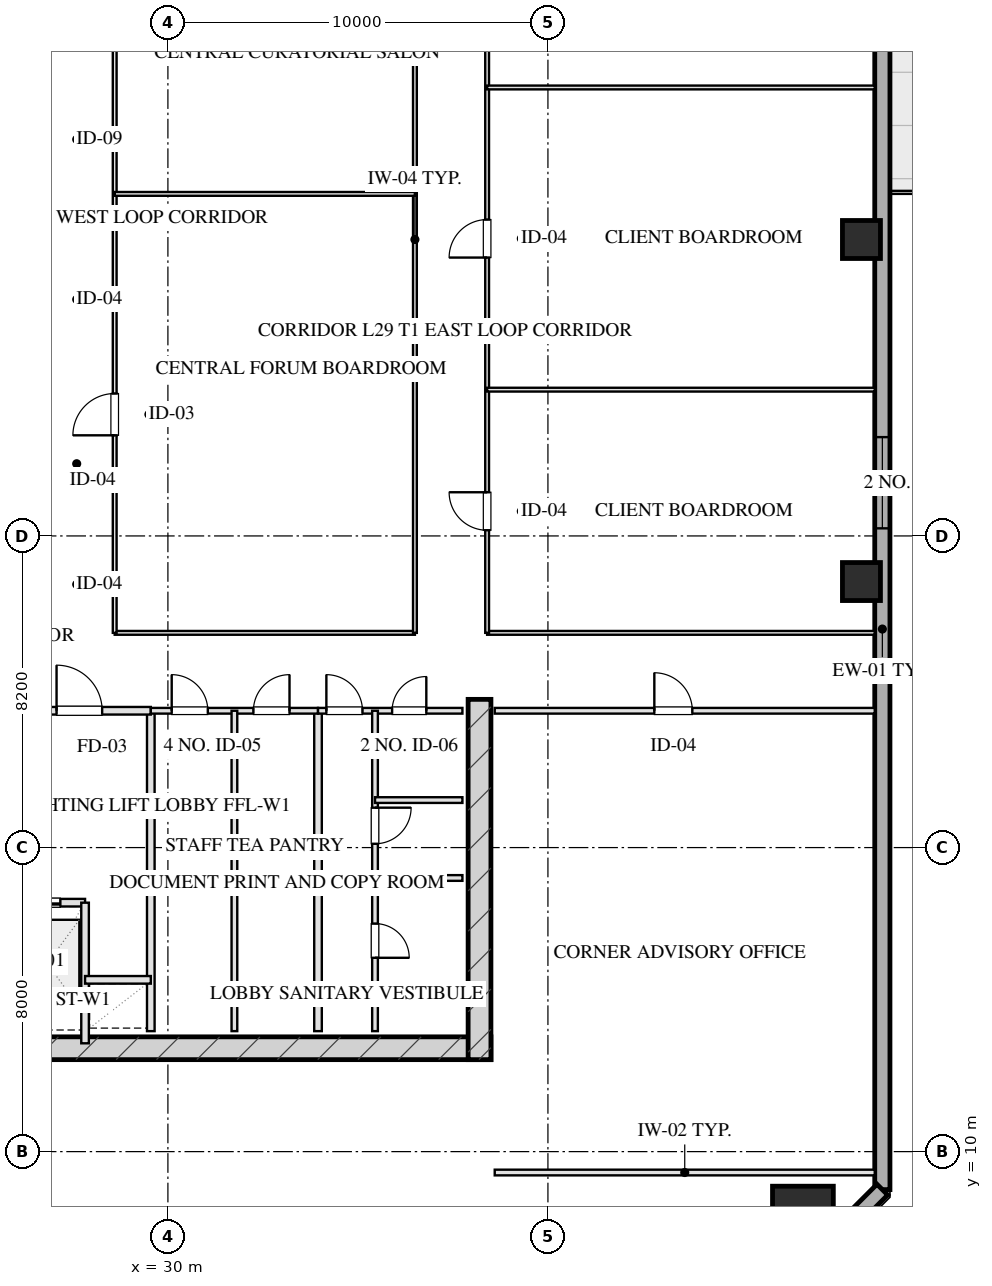
"""IFC4 building model, lengths in metres.
Left out: names, types, materials, properties, quantities, classifications, styles, units other than length and angle.
Written with IfcOpenShell. Run it as: python <this file> out.ifc"""

import sys

from ifc_helpers import new_model, si_unit, direction, frame, frame_2d, origin, origin_2d, place, context, subcontext, project, spatial, rectangle, hollow_rectangle, extrude, element, fill, save


model = new_model("IFC4")
c1 = context("Model", 3, precision=1e-05, world=origin(), true_north=direction((0.0, 1.0)))
c2 = subcontext(c1, "Body", "Model", "MODEL_VIEW")
j1 = project(units=[si_unit("LENGTHUNIT", "METRE"), si_unit("PLANEANGLEUNIT", "RADIAN")], contexts=[c1])
p1 = place(None, origin())
s1 = spatial("IfcSite", under=j1, at=p1, CompositionType="ELEMENT")
p2 = place(p1, origin())
s2 = spatial("IfcBuilding", under=s1, at=p2, CompositionType="ELEMENT")
p3 = place(p2, frame((0.0, 0.0, 113.85)))
s3 = spatial("IfcBuildingStorey", under=s2, at=p3, CompositionType="ELEMENT", Elevation=113.85)
p4 = place(p3, frame((21.5, 12.72, 0.0), z_axis=(0.0, 0.0, 1.0), x_axis=(1.0, 0.0, 0.0)))
e1 = element("IfcWall", 1, at=p4, inside=s3, PredefinedType="SHEAR", context=c2, shape_type="SweptSolid", body=[
    extrude(rectangle(XDim=17.0, YDim=0.6, at=frame_2d((8.5, 0.0))), origin(), (0.0, 0.0, 1.0), 3.45),
])
p5 = place(p3, frame((38.2, 21.9, 0.0), z_axis=(0.0, 0.0, 1.0), x_axis=(0.0, -1.0, 0.0)))
e2 = element("IfcWall", 2, at=p5, inside=s3, PredefinedType="SHEAR", context=c2, shape_type="SweptSolid", body=[
    extrude(rectangle(XDim=9.48, YDim=0.6, at=frame_2d((4.74, 0.0))), origin(), (0.0, 0.0, 1.0), 3.45),
])
p6 = place(p3, frame((46.71, 8.29, 0.0), z_axis=(0.0, 0.0, 1.0), x_axis=(1.0, 0.0, 0.0)))
e3 = element("IfcColumn", 3, at=p6, inside=s3, PredefinedType="COLUMN", context=c2, shape_type="SweptSolid", body=[
    extrude(hollow_rectangle(XDim=1.6, YDim=1.6, WallThickness=0.055, at=origin_2d()), origin(), (0.0, 0.0, 1.0), 3.451),
])
for number, where, z_axis, x_axis in (
    (4, (48.25, 25.0, 0.0), (0.0, 0.0, 1.0), (1.0, 0.0, 0.0)),
    (5, (48.25, 34.0, 0.0), (0.0, 0.0, 1.0), (1.0, 0.0, 0.0)),
):
    element("IfcColumn", number, at=place(p3, frame(where, z_axis=z_axis, x_axis=x_axis)), inside=s3, PredefinedType="COLUMN", context=c2, shape_type="SweptSolid", body=[
        extrude(hollow_rectangle(XDim=1.0, YDim=1.0, WallThickness=0.036, at=origin_2d()), origin(), (0.0, 0.0, 1.0), 3.451),
    ])
p7 = place(p3, frame((48.8, 59.0, 0.0), z_axis=(0.0, 0.0, 1.0), x_axis=(0.0, -1.0, 0.0)))
e6 = element("IfcWall", 6, at=p7, inside=s3, PredefinedType="SOLIDWALL", context=c2, shape_type="SweptSolid", body=[
    extrude(rectangle(XDim=50.0, YDim=0.4, at=frame_2d((25.0, 0.0))), origin(), (0.0, 0.0, 1.0), 2.61),
])
p8 = place(p7, frame((30.2, 0.0, 0.75)))
e7 = element("IfcOpeningElement", 7, at=p8, cuts=e6, PredefinedType="OPENING", context=c2, shape_type="SweptSolid", body=[
    extrude(rectangle(XDim=2.4, YDim=1.46, at=frame_2d((1.2, 0.73))), frame((0.0, 0.21, 0.0), z_axis=(0.0, -1.0, 0.0), x_axis=(1.0, 0.0, 0.0)), (0.0, 0.0, 1.0), 0.42),
])
p9 = place(p7, frame((18.65, 0.0, 0.0)))
e8 = element("IfcOpeningElement", 8, at=p9, cuts=e6, PredefinedType="OPENING", context=c2, shape_type="SweptSolid", body=[
    extrude(rectangle(XDim=1.1, YDim=2.15, at=frame_2d((0.55, 1.075))), frame((0.0, 0.21, 0.0), z_axis=(0.0, -1.0, 0.0), x_axis=(1.0, 0.0, 0.0)), (0.0, 0.0, 1.0), 0.42),
])
p10 = place(p3, frame((48.8, 9.0, 0.0), z_axis=(0.0, 0.0, 1.0), x_axis=(-0.707106781187, -0.707106781187, 0.0)))
e9 = element("IfcWall", 9, at=p10, inside=s3, PredefinedType="SOLIDWALL", context=c2, shape_type="SweptSolid", body=[
    extrude(rectangle(XDim=3.96, YDim=0.4, at=frame_2d((1.98, 0.0))), origin(), (0.0, 0.0, 1.0), 2.61),
])
p11 = place(p3, frame((29.55, 21.6, 0.0), z_axis=(0.0, 0.0, 1.0), x_axis=(0.0, -1.0, 0.0)))
e10 = element("IfcWall", 10, at=p11, inside=s3, PredefinedType="PARTITIONING", context=c2, shape_type="SweptSolid", body=[
    extrude(rectangle(XDim=8.43, YDim=0.2, at=frame_2d((4.215, 0.0))), origin(), (0.0, 0.0, 1.0), 3.175),
])
p12 = place(p3, frame((25.72, 21.6, 0.0), z_axis=(0.0, 0.0, 1.0), x_axis=(1.0, 0.0, 0.0)))
e11 = element("IfcWall", 11, at=p12, inside=s3, PredefinedType="PARTITIONING", context=c2, shape_type="SweptSolid", body=[
    extrude(rectangle(XDim=3.83, YDim=0.2, at=frame_2d((1.915, 0.0))), origin(), (0.0, 0.0, 1.0), 3.175),
])
p13 = place(p12, frame((1.35, 0.0, 0.0)))
e12 = element("IfcOpeningElement", 12, at=p13, cuts=e11, PredefinedType="OPENING", context=c2, shape_type="SweptSolid", body=[
    extrude(rectangle(XDim=1.2, YDim=2.05, at=frame_2d((0.6, 1.025))), frame((0.0, 0.11, 0.0), z_axis=(0.0, -1.0, 0.0), x_axis=(1.0, 0.0, 0.0)), (0.0, 0.0, 1.0), 0.22),
])
p14 = place(p3, frame((25.72, 16.55, 0.0), z_axis=(0.0, 0.0, 1.0), x_axis=(1.0, 0.0, 0.0)))
e13 = element("IfcWall", 13, at=p14, inside=s3, PredefinedType="PARTITIONING", context=c2, shape_type="SweptSolid", body=[
    extrude(rectangle(XDim=2.1, YDim=0.2, at=frame_2d((1.05, 0.0))), origin(), (0.0, 0.0, 1.0), 3.175),
])
p15 = place(p14, frame((0.35, 0.0, 0.0)))
e14 = element("IfcOpeningElement", 14, at=p15, cuts=e13, PredefinedType="OPENING", context=c2, shape_type="SweptSolid", body=[
    extrude(rectangle(XDim=1.1, YDim=2.05, at=frame_2d((0.55, 1.025))), frame((0.0, 0.11, 0.0), z_axis=(0.0, -1.0, 0.0), x_axis=(1.0, 0.0, 0.0)), (0.0, 0.0, 1.0), 0.22),
])
p16 = place(p3, frame((27.82, 16.55, 0.0), z_axis=(0.0, 0.0, 1.0), x_axis=(0.0, -1.0, 0.0)))
e15 = element("IfcWall", 15, at=p16, inside=s3, PredefinedType="PARTITIONING", context=c2, shape_type="SweptSolid", body=[
    extrude(rectangle(XDim=3.7, YDim=0.2, at=frame_2d((1.85, 0.0))), origin(), (0.0, 0.0, 1.0), 3.175),
])
p17 = place(p3, frame((27.82, 14.52, 0.0), z_axis=(0.0, 0.0, 1.0), x_axis=(1.0, 0.0, 0.0)))
e16 = element("IfcWall", 16, at=p17, inside=s3, PredefinedType="PARTITIONING", context=c2, shape_type="SweptSolid", body=[
    extrude(rectangle(XDim=1.73, YDim=0.2, at=frame_2d((0.865, 0.0))), origin(), (0.0, 0.0, 1.0), 3.175),
])
p18 = place(p3, frame((33.95, 21.6, 0.0), z_axis=(0.0, 0.0, 1.0), x_axis=(0.0, -1.0, 0.0)))
e17 = element("IfcWall", 17, at=p18, inside=s3, PredefinedType="PARTITIONING", context=c2, shape_type="SweptSolid", body=[
    extrude(rectangle(XDim=8.43, YDim=0.2, at=frame_2d((4.215, 0.0))), origin(), (0.0, 0.0, 1.0), 3.175),
])
p19 = place(p3, frame((29.55, 21.6, 0.0), z_axis=(0.0, 0.0, 1.0), x_axis=(1.0, 0.0, 0.0)))
e18 = element("IfcWall", 18, at=p19, inside=s3, PredefinedType="PARTITIONING", context=c2, shape_type="SweptSolid", body=[
    extrude(rectangle(XDim=4.4, YDim=0.15, at=frame_2d((2.2, 0.0))), origin(), (0.0, 0.0, 1.0), 3.175),
])
p20 = place(p19, frame((0.55, 0.0, 0.0)))
e19 = element("IfcOpeningElement", 19, at=p20, cuts=e18, PredefinedType="OPENING", context=c2, shape_type="SweptSolid", body=[
    extrude(rectangle(XDim=0.95, YDim=2.05, at=frame_2d((0.475, 1.025))), frame((0.0, 0.085, 0.0), z_axis=(0.0, -1.0, 0.0), x_axis=(1.0, 0.0, 0.0)), (0.0, 0.0, 1.0), 0.17),
])
p21 = place(p19, frame((2.7, 0.0, 0.0)))
e20 = element("IfcOpeningElement", 20, at=p21, cuts=e18, PredefinedType="OPENING", context=c2, shape_type="SweptSolid", body=[
    extrude(rectangle(XDim=0.95, YDim=2.05, at=frame_2d((0.475, 1.025))), frame((0.0, 0.085, 0.0), z_axis=(0.0, -1.0, 0.0), x_axis=(1.0, 0.0, 0.0)), (0.0, 0.0, 1.0), 0.17),
])
p22 = place(p3, frame((31.75, 21.6, 0.0), z_axis=(0.0, 0.0, 1.0), x_axis=(0.0, -1.0, 0.0)))
e21 = element("IfcWall", 21, at=p22, inside=s3, PredefinedType="PARTITIONING", context=c2, shape_type="SweptSolid", body=[
    extrude(rectangle(XDim=8.43, YDim=0.15, at=frame_2d((4.215, 0.0))), origin(), (0.0, 0.0, 1.0), 3.175),
])
p23 = place(p3, frame((33.95, 21.6, 0.0), z_axis=(0.0, 0.0, 1.0), x_axis=(1.0, 0.0, 0.0)))
e22 = element("IfcWall", 22, at=p23, inside=s3, PredefinedType="PARTITIONING", context=c2, shape_type="SweptSolid", body=[
    extrude(rectangle(XDim=3.8, YDim=0.15, at=frame_2d((1.9, 0.0))), origin(), (0.0, 0.0, 1.0), 3.175),
])
p24 = place(p23, frame((0.22, 0.0, 0.0)))
e23 = element("IfcOpeningElement", 23, at=p24, cuts=e22, PredefinedType="OPENING", context=c2, shape_type="SweptSolid", body=[
    extrude(rectangle(XDim=0.95, YDim=2.05, at=frame_2d((0.475, 1.025))), frame((0.0, 0.085, 0.0), z_axis=(0.0, -1.0, 0.0), x_axis=(1.0, 0.0, 0.0)), (0.0, 0.0, 1.0), 0.17),
])
p25 = place(p23, frame((1.95, 0.0, 0.0)))
e24 = element("IfcOpeningElement", 24, at=p25, cuts=e22, PredefinedType="OPENING", context=c2, shape_type="SweptSolid", body=[
    extrude(rectangle(XDim=0.9, YDim=2.05, at=frame_2d((0.45, 1.025))), frame((0.0, 0.085, 0.0), z_axis=(0.0, -1.0, 0.0), x_axis=(1.0, 0.0, 0.0)), (0.0, 0.0, 1.0), 0.17),
])
p26 = place(p3, frame((35.45, 21.6, 0.0), z_axis=(0.0, 0.0, 1.0), x_axis=(0.0, -1.0, 0.0)))
e25 = element("IfcWall", 25, at=p26, inside=s3, PredefinedType="PARTITIONING", context=c2, shape_type="SweptSolid", body=[
    extrude(rectangle(XDim=8.43, YDim=0.15, at=frame_2d((4.215, 0.0))), origin(), (0.0, 0.0, 1.0), 2.815),
])
p27 = place(p26, frame((2.55, 0.0, 0.0)))
e26 = element("IfcOpeningElement", 26, at=p27, cuts=e25, PredefinedType="OPENING", context=c2, shape_type="SweptSolid", body=[
    extrude(rectangle(XDim=0.95, YDim=2.05, at=frame_2d((0.475, 1.025))), frame((0.0, 0.085, 0.0), z_axis=(0.0, -1.0, 0.0), x_axis=(1.0, 0.0, 0.0)), (0.0, 0.0, 1.0), 0.17),
])
p28 = place(p26, frame((5.6, 0.0, 0.0)))
e27 = element("IfcOpeningElement", 27, at=p28, cuts=e25, PredefinedType="OPENING", context=c2, shape_type="SweptSolid", body=[
    extrude(rectangle(XDim=0.9, YDim=2.05, at=frame_2d((0.45, 1.025))), frame((0.0, 0.085, 0.0), z_axis=(0.0, -1.0, 0.0), x_axis=(1.0, 0.0, 0.0)), (0.0, 0.0, 1.0), 0.17),
])
for number, where, z_axis, x_axis in (
    (28, (35.45, 17.2, 0.0), (0.0, 0.0, 1.0), (1.0, 0.0, 0.0)),
    (29, (35.45, 19.25, 0.0), (0.0, 0.0, 1.0), (1.0, 0.0, 0.0)),
):
    element("IfcWall", number, at=place(p3, frame(where, z_axis=z_axis, x_axis=x_axis)), inside=s3, PredefinedType="PARTITIONING", context=c2, shape_type="SweptSolid", body=[
        extrude(rectangle(XDim=2.3, YDim=0.15, at=frame_2d((1.15, 0.0))), origin(), (0.0, 0.0, 1.0), 3.175),
    ])
p29 = place(p3, frame((38.6, 9.45, 0.0), z_axis=(0.0, 0.0, 1.0), x_axis=(1.0, 0.0, 0.0)))
e30 = element("IfcWall", 30, at=p29, inside=s3, PredefinedType="PARTITIONING", context=c2, shape_type="SweptSolid", body=[
    extrude(rectangle(XDim=10.0, YDim=0.15, at=frame_2d((5.0, 0.0))), origin(), (0.0, 0.0, 1.0), 3.175),
])
p30 = place(p3, frame((38.6, 21.6, 0.0), z_axis=(0.0, 0.0, 1.0), x_axis=(1.0, 0.0, 0.0)))
e31 = element("IfcWall", 31, at=p30, inside=s3, PredefinedType="PARTITIONING", context=c2, shape_type="SweptSolid", body=[
    extrude(rectangle(XDim=10.0, YDim=0.15, at=frame_2d((5.0, 0.0))), origin(), (0.0, 0.0, 1.0), 3.175),
])
p31 = place(p30, frame((4.2, 0.0, 0.0)))
e32 = element("IfcOpeningElement", 32, at=p31, cuts=e31, PredefinedType="OPENING", context=c2, shape_type="SweptSolid", body=[
    extrude(rectangle(XDim=1.0, YDim=2.05, at=frame_2d((0.5, 1.025))), frame((0.0, 0.085, 0.0), z_axis=(0.0, -1.0, 0.0), x_axis=(1.0, 0.0, 0.0)), (0.0, 0.0, 1.0), 0.17),
])
p32 = place(p3, frame((28.6, 23.65, 0.0), z_axis=(0.0, 0.0, 1.0), x_axis=(1.0, 0.0, 0.0)))
e33 = element("IfcWall", 33, at=p32, inside=s3, PredefinedType="MOVABLE", context=c2, shape_type="SweptSolid", body=[
    extrude(rectangle(XDim=7.9, YDim=0.1, at=frame_2d((3.95, 0.0))), origin(), (0.0, 0.0, 1.0), 3.175),
])
p33 = place(p3, frame((38.4, 23.65, 0.0), z_axis=(0.0, 0.0, 1.0), x_axis=(1.0, 0.0, 0.0)))
e34 = element("IfcWall", 34, at=p33, inside=s3, PredefinedType="MOVABLE", context=c2, shape_type="SweptSolid", body=[
    extrude(rectangle(XDim=10.2, YDim=0.1, at=frame_2d((5.1, 0.0))), origin(), (0.0, 0.0, 1.0), 3.175),
])
p34 = place(p3, frame((28.6, 23.65, 0.0), z_axis=(0.0, 0.0, 1.0), x_axis=(0.0, 1.0, 0.0)))
e35 = element("IfcWall", 35, at=p34, inside=s3, PredefinedType="MOVABLE", context=c2, shape_type="SweptSolid", body=[
    extrude(rectangle(XDim=20.7, YDim=0.1, at=frame_2d((10.35, 0.0))), origin(), (0.0, 0.0, 1.0), 3.175),
])
p35 = place(p34, frame((5.198, 0.0, 0.0)))
e36 = element("IfcOpeningElement", 36, at=p35, cuts=e35, PredefinedType="OPENING", context=c2, shape_type="SweptSolid", body=[
    extrude(rectangle(XDim=1.1, YDim=2.05, at=frame_2d((0.55, 1.025))), frame((0.0, 0.06, 0.0), z_axis=(0.0, -1.0, 0.0), x_axis=(1.0, 0.0, 0.0)), (0.0, 0.0, 1.0), 0.12),
])
p36 = place(p34, frame((15.667, 0.0, 0.0)))
e37 = element("IfcOpeningElement", 37, at=p36, cuts=e35, PredefinedType="OPENING", context=c2, shape_type="SweptSolid", body=[
    extrude(rectangle(XDim=1.1, YDim=2.05, at=frame_2d((0.55, 1.025))), frame((0.0, 0.06, 0.0), z_axis=(0.0, -1.0, 0.0), x_axis=(1.0, 0.0, 0.0)), (0.0, 0.0, 1.0), 0.12),
])
p37 = place(p3, frame((36.5, 23.65, 0.0), z_axis=(0.0, 0.0, 1.0), x_axis=(0.0, 1.0, 0.0)))
e38 = element("IfcWall", 38, at=p37, inside=s3, PredefinedType="MOVABLE", context=c2, shape_type="SweptSolid", body=[
    extrude(rectangle(XDim=20.7, YDim=0.1, at=frame_2d((10.35, 0.0))), origin(), (0.0, 0.0, 1.0), 3.175),
])
p38 = place(p3, frame((38.4, 23.65, 0.0), z_axis=(0.0, 0.0, 1.0), x_axis=(0.0, 1.0, 0.0)))
e39 = element("IfcWall", 39, at=p38, inside=s3, PredefinedType="MOVABLE", context=c2, shape_type="SweptSolid", body=[
    extrude(rectangle(XDim=20.7, YDim=0.1, at=frame_2d((10.35, 0.0))), origin(), (0.0, 0.0, 1.0), 3.175),
])
p39 = place(p38, frame((2.699, 0.0, 0.0)))
e40 = element("IfcOpeningElement", 40, at=p39, cuts=e39, PredefinedType="OPENING", context=c2, shape_type="SweptSolid", body=[
    extrude(rectangle(XDim=1.0, YDim=2.05, at=frame_2d((0.5, 1.025))), frame((0.0, 0.06, 0.0), z_axis=(0.0, -1.0, 0.0), x_axis=(1.0, 0.0, 0.0)), (0.0, 0.0, 1.0), 0.12),
])
p40 = place(p38, frame((9.875, 0.0, 0.0)))
e41 = element("IfcOpeningElement", 41, at=p40, cuts=e39, PredefinedType="OPENING", context=c2, shape_type="SweptSolid", body=[
    extrude(rectangle(XDim=1.0, YDim=2.05, at=frame_2d((0.5, 1.025))), frame((0.0, 0.06, 0.0), z_axis=(0.0, -1.0, 0.0), x_axis=(1.0, 0.0, 0.0)), (0.0, 0.0, 1.0), 0.12),
])
p41 = place(p38, frame((17.025, 0.0, 0.0)))
e42 = element("IfcOpeningElement", 42, at=p41, cuts=e39, PredefinedType="OPENING", context=c2, shape_type="SweptSolid", body=[
    extrude(rectangle(XDim=1.0, YDim=2.05, at=frame_2d((0.5, 1.025))), frame((0.0, 0.06, 0.0), z_axis=(0.0, -1.0, 0.0), x_axis=(1.0, 0.0, 0.0)), (0.0, 0.0, 1.0), 0.12),
])
p42 = place(p3, frame((28.6, 35.2, 0.0), z_axis=(0.0, 0.0, 1.0), x_axis=(1.0, 0.0, 0.0)))
e43 = element("IfcWall", 43, at=p42, inside=s3, PredefinedType="MOVABLE", context=c2, shape_type="SweptSolid", body=[
    extrude(rectangle(XDim=7.9, YDim=0.1, at=frame_2d((3.95, 0.0))), origin(), (0.0, 0.0, 1.0), 3.175),
])
for number, where, z_axis, x_axis in (
    (44, (38.4, 30.049, 0.0), (0.0, 0.0, 1.0), (1.0, 0.0, 0.0)),
    (45, (38.4, 38.0, 0.0), (0.0, 0.0, 1.0), (1.0, 0.0, 0.0)),
):
    element("IfcWall", number, at=place(p3, frame(where, z_axis=z_axis, x_axis=x_axis)), inside=s3, PredefinedType="MOVABLE", context=c2, shape_type="SweptSolid", body=[
        extrude(rectangle(XDim=10.2, YDim=0.1, at=frame_2d((5.1, 0.0))), origin(), (0.0, 0.0, 1.0), 3.175),
    ])
p43 = place(p8, origin())
e46 = element("IfcWindow", 46, at=p43, inside=s3, PartitioningType="TRIPLE_PANEL_VERTICAL", PredefinedType="WINDOW", context=c2, shape_type="SweptSolid", body=[
    extrude(rectangle(XDim=2.4, YDim=1.46, at=frame_2d((1.2, 0.73))), frame((0.0, 0.03, 0.0), z_axis=(0.0, -1.0, 0.0), x_axis=(1.0, 0.0, 0.0)), (0.0, 0.0, 1.0), 0.06),
])
fill(e7, e46)
p44 = place(p13, origin())
e47 = element("IfcDoor", 47, at=p44, inside=s3, OperationType="SINGLE_SWING_LEFT", PredefinedType="DOOR", context=c2, shape_type="SweptSolid", body=[
    extrude(rectangle(XDim=1.2, YDim=2.05, at=frame_2d((0.6, 1.025))), frame((0.0, 0.025, 0.0), z_axis=(0.0, -1.0, 0.0), x_axis=(1.0, 0.0, 0.0)), (0.0, 0.0, 1.0), 0.05),
])
fill(e12, e47)
p45 = place(p15, origin())
e48 = element("IfcDoor", 48, at=p45, inside=s3, OperationType="DOUBLE_DOOR_SLIDING", PredefinedType="DOOR", context=c2, shape_type="SweptSolid", body=[
    extrude(rectangle(XDim=1.1, YDim=2.05, at=frame_2d((0.55, 1.025))), frame((0.0, 0.025, 0.0), z_axis=(0.0, -1.0, 0.0), x_axis=(1.0, 0.0, 0.0)), (0.0, 0.0, 1.0), 0.05),
])
fill(e14, e48)
p46 = place(p20, origin())
e49 = element("IfcDoor", 49, at=p46, inside=s3, OperationType="SINGLE_SWING_LEFT", PredefinedType="DOOR", context=c2, shape_type="SweptSolid", body=[
    extrude(rectangle(XDim=0.95, YDim=2.05, at=frame_2d((0.475, 1.025))), frame((0.0, 0.025, 0.0), z_axis=(0.0, -1.0, 0.0), x_axis=(1.0, 0.0, 0.0)), (0.0, 0.0, 1.0), 0.05),
])
fill(e19, e49)
p47 = place(p21, origin())
e50 = element("IfcDoor", 50, at=p47, inside=s3, OperationType="SINGLE_SWING_RIGHT", PredefinedType="DOOR", context=c2, shape_type="SweptSolid", body=[
    extrude(rectangle(XDim=0.95, YDim=2.05, at=frame_2d((0.475, 1.025))), frame((0.0, 0.025, 0.0), z_axis=(0.0, -1.0, 0.0), x_axis=(1.0, 0.0, 0.0)), (0.0, 0.0, 1.0), 0.05),
])
fill(e20, e50)
p48 = place(p24, origin())
e51 = element("IfcDoor", 51, at=p48, inside=s3, OperationType="SINGLE_SWING_LEFT", PredefinedType="DOOR", context=c2, shape_type="SweptSolid", body=[
    extrude(rectangle(XDim=0.95, YDim=2.05, at=frame_2d((0.475, 1.025))), frame((0.0, 0.025, 0.0), z_axis=(0.0, -1.0, 0.0), x_axis=(1.0, 0.0, 0.0)), (0.0, 0.0, 1.0), 0.05),
])
fill(e23, e51)
p49 = place(p25, origin())
e52 = element("IfcDoor", 52, at=p49, inside=s3, OperationType="SINGLE_SWING_RIGHT", PredefinedType="DOOR", context=c2, shape_type="SweptSolid", body=[
    extrude(rectangle(XDim=0.9, YDim=2.05, at=frame_2d((0.45, 1.025))), frame((0.0, 0.025, 0.0), z_axis=(0.0, -1.0, 0.0), x_axis=(1.0, 0.0, 0.0)), (0.0, 0.0, 1.0), 0.05),
])
fill(e24, e52)
p50 = place(p27, origin())
e53 = element("IfcDoor", 53, at=p50, inside=s3, OperationType="SINGLE_SWING_LEFT", PredefinedType="DOOR", context=c2, shape_type="SweptSolid", body=[
    extrude(rectangle(XDim=0.95, YDim=2.05, at=frame_2d((0.475, 1.025))), frame((0.0, 0.025, 0.0), z_axis=(0.0, -1.0, 0.0), x_axis=(1.0, 0.0, 0.0)), (0.0, 0.0, 1.0), 0.05),
])
fill(e26, e53)
p51 = place(p28, origin())
e54 = element("IfcDoor", 54, at=p51, inside=s3, OperationType="SINGLE_SWING_RIGHT", PredefinedType="DOOR", context=c2, shape_type="SweptSolid", body=[
    extrude(rectangle(XDim=0.9, YDim=2.05, at=frame_2d((0.45, 1.025))), frame((0.0, 0.025, 0.0), z_axis=(0.0, -1.0, 0.0), x_axis=(1.0, 0.0, 0.0)), (0.0, 0.0, 1.0), 0.05),
])
fill(e27, e54)
p52 = place(p31, origin())
e55 = element("IfcDoor", 55, at=p52, inside=s3, OperationType="SINGLE_SWING_LEFT", PredefinedType="DOOR", context=c2, shape_type="SweptSolid", body=[
    extrude(rectangle(XDim=1.0, YDim=2.05, at=frame_2d((0.5, 1.025))), frame((0.0, 0.025, 0.0), z_axis=(0.0, -1.0, 0.0), x_axis=(1.0, 0.0, 0.0)), (0.0, 0.0, 1.0), 0.05),
])
fill(e32, e55)
p53 = place(p35, origin())
e56 = element("IfcDoor", 56, at=p53, inside=s3, OperationType="SINGLE_SWING_LEFT", PredefinedType="DOOR", context=c2, shape_type="SweptSolid", body=[
    extrude(rectangle(XDim=1.1, YDim=2.05, at=frame_2d((0.55, 1.025))), frame((0.0, 0.025, 0.0), z_axis=(0.0, -1.0, 0.0), x_axis=(1.0, 0.0, 0.0)), (0.0, 0.0, 1.0), 0.05),
])
fill(e36, e56)
p54 = place(p39, origin())
e57 = element("IfcDoor", 57, at=p54, inside=s3, OperationType="SINGLE_SWING_RIGHT", PredefinedType="DOOR", context=c2, shape_type="SweptSolid", body=[
    extrude(rectangle(XDim=1.0, YDim=2.05, at=frame_2d((0.5, 1.025))), frame((0.0, 0.025, 0.0), z_axis=(0.0, -1.0, 0.0), x_axis=(1.0, 0.0, 0.0)), (0.0, 0.0, 1.0), 0.05),
])
fill(e40, e57)
p55 = place(p40, origin())
e58 = element("IfcDoor", 58, at=p55, inside=s3, OperationType="SINGLE_SWING_LEFT", PredefinedType="DOOR", context=c2, shape_type="SweptSolid", body=[
    extrude(rectangle(XDim=1.0, YDim=2.05, at=frame_2d((0.5, 1.025))), frame((0.0, 0.025, 0.0), z_axis=(0.0, -1.0, 0.0), x_axis=(1.0, 0.0, 0.0)), (0.0, 0.0, 1.0), 0.05),
])
fill(e41, e58)
save(model, sys.argv[1])
